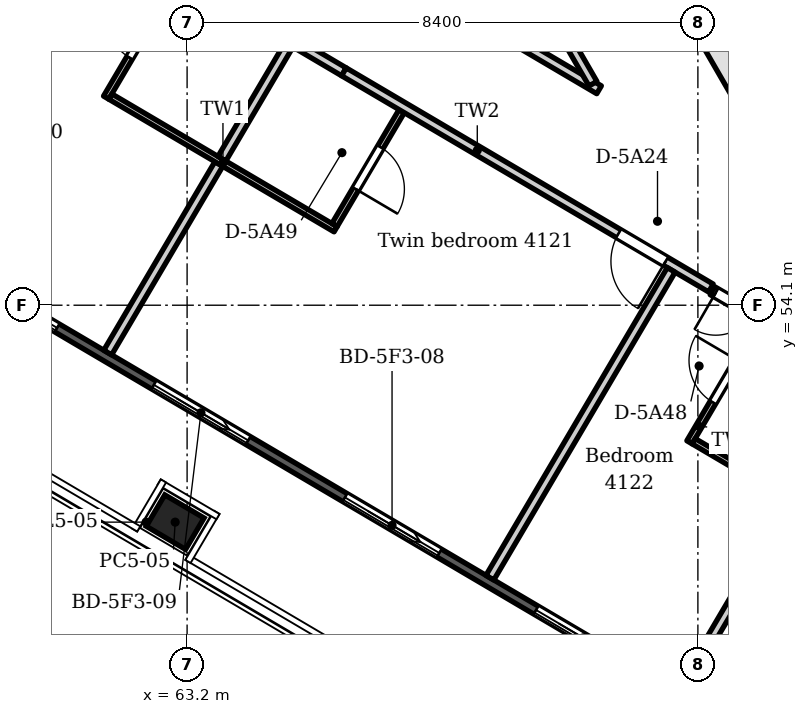
"""IFC4 building model, lengths in metres.
Left out: names, types, materials, properties, quantities, classifications, styles, units other than length and angle.
Written with IfcOpenShell. Run it as: python <this file> out.ifc"""

import sys

from ifc_helpers import new_model, si_unit, direction, frame, frame_2d, origin, origin_2d, place, context, subcontext, project, spatial, polyline, rectangle, outline, extrude, element, fill, save


model = new_model("IFC4")
c1 = context("Model", 3, precision=1e-05, world=origin(), true_north=direction((0.0, 1.0)))
c2 = subcontext(c1, "Body", "Model", "MODEL_VIEW")
j1 = project(units=[si_unit("LENGTHUNIT", "METRE"), si_unit("PLANEANGLEUNIT", "RADIAN")], contexts=[c1])
p1 = place(None, origin())
s1 = spatial("IfcSite", under=j1, at=p1, CompositionType="ELEMENT")
p2 = place(p1, origin())
s2 = spatial("IfcBuilding", under=s1, at=p2, CompositionType="ELEMENT")
p3 = place(p2, frame((0.0, 0.0, 161.1)))
s3 = spatial("IfcBuildingStorey", under=s2, at=p3, CompositionType="ELEMENT", Elevation=161.1)
p4 = place(p3, frame((71.117, 60.24, 0.0), z_axis=(0.0, 0.0, 1.0), x_axis=(0.500038571144, -0.866003133579, 0.0)))
e1 = element("IfcWall", 1, at=p4, inside=s3, PredefinedType="SHEAR", context=c2, shape_type="SweptSolid", body=[
    extrude(outline(polyline([(0.0, -0.45), (4.969, -0.45), (4.728, 0.45), (0.241, 0.45), (0.0, -0.45)])), origin(), (0.0, 0.0, 1.0), 3.6),
])
p5 = place(p4, frame((1.785, 0.0, 0.0)))
e2 = element("IfcOpeningElement", 2, at=p5, cuts=e1, PredefinedType="OPENING", context=c2, shape_type="SweptSolid", body=[
    extrude(rectangle(XDim=1.4, YDim=2.1, at=frame_2d((0.7, 1.05))), frame((0.0, 0.46, 0.0), z_axis=(0.0, -1.0, 0.0), x_axis=(1.0, 0.0, 0.0)), (0.0, 0.0, 1.0), 0.92),
])
p6 = place(p3, frame((63.004, 50.533, -0.35), z_axis=(0.0, 0.0, 1.0), x_axis=(-0.861629160442, 0.507538362961, 0.0)))
e3 = element("IfcColumn", 3, at=p6, inside=s3, PredefinedType="COLUMN", context=c2, shape_type="SweptSolid", body=[
    extrude(rectangle(XDim=0.75, YDim=0.6, at=origin_2d()), origin(), (0.0, 0.0, 1.0), 3.95),
])
p7 = place(p3, frame((90.139, 36.597, 0.0), z_axis=(0.0, 0.0, 1.0), x_axis=(-0.861630336939, 0.507536365659, 0.0)))
e4 = element("IfcWall", 4, at=p7, inside=s3, PredefinedType="SOLIDWALL", context=c2, shape_type="SweptSolid", body=[
    extrude(outline(polyline([(0.149, 0.075), (0.149, -0.075), (43.617, -0.075), (43.617, 0.075), (0.149, 0.075)])), origin(), (0.0, 0.0, 1.0), 3.3),
])
p8 = place(p7, frame((1.224, 0.0, 0.0)))
e5 = element("IfcOpeningElement", 5, at=p8, cuts=e4, PredefinedType="OPENING", context=c2, shape_type="SweptSolid", body=[
    extrude(rectangle(XDim=1.8, YDim=2.6, at=frame_2d((0.9, 1.3))), frame((0.0, 0.085, 0.0), z_axis=(0.0, -1.0, 0.0), x_axis=(1.0, 0.0, 0.0)), (0.0, 0.0, 1.0), 0.17),
])
p9 = place(p7, frame((4.571, 0.0, 0.0)))
e6 = element("IfcOpeningElement", 6, at=p9, cuts=e4, PredefinedType="OPENING", context=c2, shape_type="SweptSolid", body=[
    extrude(rectangle(XDim=1.8, YDim=2.6, at=frame_2d((0.9, 1.3))), frame((0.0, 0.085, 0.0), z_axis=(0.0, -1.0, 0.0), x_axis=(1.0, 0.0, 0.0)), (0.0, 0.0, 1.0), 0.17),
])
p10 = place(p7, frame((8.218, 0.0, 0.0)))
e7 = element("IfcOpeningElement", 7, at=p10, cuts=e4, PredefinedType="OPENING", context=c2, shape_type="SweptSolid", body=[
    extrude(rectangle(XDim=1.8, YDim=2.6, at=frame_2d((0.9, 1.3))), frame((0.0, 0.085, 0.0), z_axis=(0.0, -1.0, 0.0), x_axis=(1.0, 0.0, 0.0)), (0.0, 0.0, 1.0), 0.17),
])
p11 = place(p7, frame((11.865, 0.0, 0.0)))
e8 = element("IfcOpeningElement", 8, at=p11, cuts=e4, PredefinedType="OPENING", context=c2, shape_type="SweptSolid", body=[
    extrude(rectangle(XDim=1.8, YDim=2.6, at=frame_2d((0.9, 1.3))), frame((0.0, 0.085, 0.0), z_axis=(0.0, -1.0, 0.0), x_axis=(1.0, 0.0, 0.0)), (0.0, 0.0, 1.0), 0.17),
])
p12 = place(p7, frame((15.512, 0.0, 0.0)))
e9 = element("IfcOpeningElement", 9, at=p12, cuts=e4, PredefinedType="OPENING", context=c2, shape_type="SweptSolid", body=[
    extrude(rectangle(XDim=1.8, YDim=2.6, at=frame_2d((0.9, 1.3))), frame((0.0, 0.085, 0.0), z_axis=(0.0, -1.0, 0.0), x_axis=(1.0, 0.0, 0.0)), (0.0, 0.0, 1.0), 0.17),
])
p13 = place(p7, frame((19.16, 0.0, 0.0)))
e10 = element("IfcOpeningElement", 10, at=p13, cuts=e4, PredefinedType="OPENING", context=c2, shape_type="SweptSolid", body=[
    extrude(rectangle(XDim=1.8, YDim=2.6, at=frame_2d((0.9, 1.3))), frame((0.0, 0.085, 0.0), z_axis=(0.0, -1.0, 0.0), x_axis=(1.0, 0.0, 0.0)), (0.0, 0.0, 1.0), 0.17),
])
p14 = place(p7, frame((22.807, 0.0, 0.0)))
e11 = element("IfcOpeningElement", 11, at=p14, cuts=e4, PredefinedType="OPENING", context=c2, shape_type="SweptSolid", body=[
    extrude(rectangle(XDim=1.8, YDim=2.6, at=frame_2d((0.9, 1.3))), frame((0.0, 0.085, 0.0), z_axis=(0.0, -1.0, 0.0), x_axis=(1.0, 0.0, 0.0)), (0.0, 0.0, 1.0), 0.17),
])
p15 = place(p7, frame((26.454, 0.0, 0.0)))
e12 = element("IfcOpeningElement", 12, at=p15, cuts=e4, PredefinedType="OPENING", context=c2, shape_type="SweptSolid", body=[
    extrude(rectangle(XDim=1.8, YDim=2.6, at=frame_2d((0.9, 1.3))), frame((0.0, 0.085, 0.0), z_axis=(0.0, -1.0, 0.0), x_axis=(1.0, 0.0, 0.0)), (0.0, 0.0, 1.0), 0.17),
])
p16 = place(p7, frame((30.101, 0.0, 0.0)))
e13 = element("IfcOpeningElement", 13, at=p16, cuts=e4, PredefinedType="OPENING", context=c2, shape_type="SweptSolid", body=[
    extrude(rectangle(XDim=1.8, YDim=2.6, at=frame_2d((0.9, 1.3))), frame((0.0, 0.085, 0.0), z_axis=(0.0, -1.0, 0.0), x_axis=(1.0, 0.0, 0.0)), (0.0, 0.0, 1.0), 0.17),
])
p17 = place(p7, frame((33.748, 0.0, 0.0)))
e14 = element("IfcOpeningElement", 14, at=p17, cuts=e4, PredefinedType="OPENING", context=c2, shape_type="SweptSolid", body=[
    extrude(rectangle(XDim=1.8, YDim=2.6, at=frame_2d((0.9, 1.3))), frame((0.0, 0.085, 0.0), z_axis=(0.0, -1.0, 0.0), x_axis=(1.0, 0.0, 0.0)), (0.0, 0.0, 1.0), 0.17),
])
p18 = place(p7, frame((37.396, 0.0, 0.0)))
e15 = element("IfcOpeningElement", 15, at=p18, cuts=e4, PredefinedType="OPENING", context=c2, shape_type="SweptSolid", body=[
    extrude(rectangle(XDim=1.8, YDim=2.6, at=frame_2d((0.9, 1.3))), frame((0.0, 0.085, 0.0), z_axis=(0.0, -1.0, 0.0), x_axis=(1.0, 0.0, 0.0)), (0.0, 0.0, 1.0), 0.17),
])
p19 = place(p7, frame((40.743, 0.0, 0.0)))
e16 = element("IfcOpeningElement", 16, at=p19, cuts=e4, PredefinedType="OPENING", context=c2, shape_type="SweptSolid", body=[
    extrude(rectangle(XDim=1.8, YDim=2.6, at=frame_2d((0.9, 1.3))), frame((0.0, 0.085, 0.0), z_axis=(0.0, -1.0, 0.0), x_axis=(1.0, 0.0, 0.0)), (0.0, 0.0, 1.0), 0.17),
])
p20 = place(p3, frame((61.894, 53.322, 0.0), z_axis=(0.0, 0.0, 1.0), x_axis=(0.507657247854, 0.86155912084, 0.0)))
e17 = element("IfcWall", 17, at=p20, inside=s3, PredefinedType="PARTITIONING", context=c2, shape_type="SweptSolid", body=[
    extrude(rectangle(XDim=3.6, YDim=0.15, at=frame_2d((1.8, 0.0))), origin(), (0.0, 0.0, 1.0), 3.3),
])
p21 = place(p3, frame((61.869, 57.514, 0.0), z_axis=(0.0, 0.0, 1.0), x_axis=(0.50769515182, 0.861536785528, 0.0)))
e18 = element("IfcWall", 18, at=p21, inside=s3, PredefinedType="PARTITIONING", context=c2, shape_type="SweptSolid", body=[
    extrude(rectangle(XDim=2.276, YDim=0.1, at=frame_2d((1.138, 0.0))), origin(), (0.0, 0.0, 1.0), 3.3),
])
p22 = place(p21, frame((0.763, 0.0, 0.0)))
e19 = element("IfcOpeningElement", 19, at=p22, cuts=e18, PredefinedType="OPENING", context=c2, shape_type="SweptSolid", body=[
    extrude(rectangle(XDim=0.8, YDim=2.1, at=frame_2d((0.4, 1.05))), frame((0.0, 0.06, 0.0), z_axis=(0.0, -1.0, 0.0), x_axis=(1.0, 0.0, 0.0)), (0.0, 0.0, 1.0), 0.12),
])
p23 = place(p3, frame((61.937, 57.531, 0.0), z_axis=(0.0, 0.0, 1.0), x_axis=(0.861687435641, -0.507439418313, 0.0)))
e20 = element("IfcWall", 20, at=p23, inside=s3, PredefinedType="PARTITIONING", context=c2, shape_type="SweptSolid", body=[
    extrude(rectangle(XDim=4.3, YDim=0.1, at=frame_2d((2.15, 0.0))), origin(), (0.0, 0.0, 1.0), 3.3),
])
p24 = place(p3, frame((63.772, 56.509, 0.0), z_axis=(0.0, 0.0, 1.0), x_axis=(0.507359649966, 0.861734405479, 0.0)))
e21 = element("IfcWall", 21, at=p24, inside=s3, PredefinedType="PARTITIONING", context=c2, shape_type="SweptSolid", body=[
    extrude(rectangle(XDim=2.325, YDim=0.15, at=frame_2d((1.163, 0.0))), origin(), (0.0, 0.0, 1.0), 3.3),
])
p25 = place(p3, frame((64.976, 58.412, 0.0), z_axis=(0.0, 0.0, 1.0), x_axis=(0.861348284073, -0.508014894982, 0.0)))
e22 = element("IfcWall", 22, at=p25, inside=s3, PredefinedType="PARTITIONING", context=c2, shape_type="SweptSolid", body=[
    extrude(rectangle(XDim=0.933, YDim=0.15, at=frame_2d((0.466, 0.0))), origin(), (0.0, 0.0, 1.0), 3.3),
])
p26 = place(p3, frame((65.625, 55.418, 0.0), z_axis=(0.0, 0.0, 1.0), x_axis=(0.507893177668, 0.861420060179, 0.0)))
e23 = element("IfcWall", 23, at=p26, inside=s3, PredefinedType="PARTITIONING", context=c2, shape_type="SweptSolid", body=[
    extrude(rectangle(XDim=2.175, YDim=0.1, at=frame_2d((1.087, 0.0))), origin(), (0.0, 0.0, 1.0), 3.3),
])
p27 = place(p26, frame((0.687, 0.0, 0.0)))
e24 = element("IfcOpeningElement", 24, at=p27, cuts=e23, PredefinedType="OPENING", context=c2, shape_type="SweptSolid", body=[
    extrude(rectangle(XDim=0.8, YDim=2.1, at=frame_2d((0.4, 1.05))), frame((0.0, 0.06, 0.0), z_axis=(0.0, -1.0, 0.0), x_axis=(1.0, 0.0, 0.0)), (0.0, 0.0, 1.0), 0.12),
])
p28 = place(p3, frame((65.779, 57.938, 0.0), z_axis=(0.0, 0.0, 1.0), x_axis=(0.861623120435, -0.507548616718, 0.0)))
e25 = element("IfcWall", 25, at=p28, inside=s3, PredefinedType="PARTITIONING", context=c2, shape_type="SweptSolid", body=[
    extrude(rectangle(XDim=7.004, YDim=0.15, at=frame_2d((3.502, 0.0))), origin(), (0.0, 0.0, 1.0), 3.3),
])
p29 = place(p28, frame((5.24, 0.0, 0.0)))
e26 = element("IfcOpeningElement", 26, at=p29, cuts=e25, PredefinedType="OPENING", context=c2, shape_type="SweptSolid", body=[
    extrude(rectangle(XDim=0.9, YDim=2.1, at=frame_2d((0.45, 1.05))), frame((0.0, 0.085, 0.0), z_axis=(0.0, -1.0, 0.0), x_axis=(1.0, 0.0, 0.0)), (0.0, 0.0, 1.0), 0.17),
])
p30 = place(p3, frame((65.863, 60.065, 0.0), z_axis=(0.0, 0.0, 1.0), x_axis=(0.861635540959, -0.507527530835, 0.0)))
e27 = element("IfcWall", 27, at=p30, inside=s3, PredefinedType="PARTITIONING", context=c2, shape_type="SweptSolid", body=[
    extrude(rectangle(XDim=4.772, YDim=0.15, at=frame_2d((2.386, 0.0))), origin(), (0.0, 0.0, 1.0), 3.3),
])
p31 = place(p30, frame((1.899, 0.0, 0.0)))
e28 = element("IfcOpeningElement", 28, at=p31, cuts=e27, PredefinedType="OPENING", context=c2, shape_type="SweptSolid", body=[
    extrude(rectangle(XDim=0.9, YDim=2.1, at=frame_2d((0.45, 1.05))), frame((0.0, 0.085, 0.0), z_axis=(0.0, -1.0, 0.0), x_axis=(1.0, 0.0, 0.0)), (0.0, 0.0, 1.0), 0.17),
])
p32 = place(p3, frame((68.179, 49.619, 0.0), z_axis=(0.0, 0.0, 1.0), x_axis=(0.507603061138, 0.861591047031, 0.0)))
e29 = element("IfcWall", 29, at=p32, inside=s3, PredefinedType="PARTITIONING", context=c2, shape_type="SweptSolid", body=[
    extrude(rectangle(XDim=5.874, YDim=0.15, at=frame_2d((2.937, 0.0))), origin(), (0.0, 0.0, 1.0), 3.3),
])
p33 = place(p3, frame((68.889, 59.448, 0.0), z_axis=(0.0, 0.0, 1.0), x_axis=(0.500259007655, -0.865875813994, 0.0)))
e30 = element("IfcWall", 30, at=p33, inside=s3, PredefinedType="PARTITIONING", context=c2, shape_type="SweptSolid", body=[
    extrude(rectangle(XDim=1.969, YDim=0.15, at=frame_2d((0.985, 0.0))), origin(), (0.0, 0.0, 1.0), 3.3),
])
p34 = place(p3, frame((71.322, 47.769, 0.0), z_axis=(0.0, 0.0, 1.0), x_axis=(0.507419363551, 0.861699245383, 0.0)))
e31 = element("IfcWall", 31, at=p34, inside=s3, PredefinedType="PARTITIONING", context=c2, shape_type="SweptSolid", body=[
    extrude(rectangle(XDim=3.688, YDim=0.15, at=frame_2d((1.844, 0.0))), origin(), (0.0, 0.0, 1.0), 3.3),
])
p35 = place(p3, frame((71.462, 51.846, 0.0), z_axis=(0.0, 0.0, 1.0), x_axis=(0.507433164297, 0.861691118541, 0.0)))
e32 = element("IfcWall", 32, at=p35, inside=s3, PredefinedType="PARTITIONING", context=c2, shape_type="SweptSolid", body=[
    extrude(rectangle(XDim=2.273, YDim=0.1, at=frame_2d((1.136, 0.0))), origin(), (0.0, 0.0, 1.0), 3.3),
])
p36 = place(p35, frame((0.761, 0.0, 0.0)))
e33 = element("IfcOpeningElement", 33, at=p36, cuts=e32, PredefinedType="OPENING", context=c2, shape_type="SweptSolid", body=[
    extrude(rectangle(XDim=0.8, YDim=2.1, at=frame_2d((0.4, 1.05))), frame((0.0, 0.06, 0.0), z_axis=(0.0, -1.0, 0.0), x_axis=(1.0, 0.0, 0.0)), (0.0, 0.0, 1.0), 0.12),
])
p37 = place(p3, frame((71.53, 51.864, 0.0), z_axis=(0.0, 0.0, 1.0), x_axis=(0.861772491813, -0.507294955972, 0.0)))
e34 = element("IfcWall", 34, at=p37, inside=s3, PredefinedType="PARTITIONING", context=c2, shape_type="SweptSolid", body=[
    extrude(rectangle(XDim=1.824, YDim=0.1, at=frame_2d((0.912, 0.0))), origin(), (0.0, 0.0, 1.0), 3.3),
])
p38 = place(p3, frame((71.839, 54.339, 0.0), z_axis=(0.0, 0.0, 1.0), x_axis=(0.865780375256, -0.500424161908, 0.0)))
e35 = element("IfcWall", 35, at=p38, inside=s3, PredefinedType="PARTITIONING", context=c2, shape_type="SweptSolid", body=[
    extrude(rectangle(XDim=0.944, YDim=0.15, at=frame_2d((0.472, 0.0))), origin(), (0.0, 0.0, 1.0), 3.3),
])
p39 = place(p38, frame((0.064, 0.0, 0.0)))
e36 = element("IfcOpeningElement", 36, at=p39, cuts=e35, PredefinedType="OPENING", context=c2, shape_type="SweptSolid", body=[
    extrude(rectangle(XDim=0.7, YDim=2.1, at=frame_2d((0.35, 1.05))), frame((0.0, 0.085, 0.0), z_axis=(0.0, -1.0, 0.0), x_axis=(1.0, 0.0, 0.0)), (0.0, 0.0, 1.0), 0.17),
])
p40 = place(p14, origin())
e37 = element("IfcDoor", 37, at=p40, inside=s3, OperationType="SLIDING_TO_LEFT", PredefinedType="DOOR", context=c2, shape_type="SweptSolid", body=[
    extrude(rectangle(XDim=1.8, YDim=2.6, at=frame_2d((0.9, 1.3))), frame((0.0, 0.025, 0.0), z_axis=(0.0, -1.0, 0.0), x_axis=(1.0, 0.0, 0.0)), (0.0, 0.0, 1.0), 0.05),
])
fill(e11, e37)
p41 = place(p15, origin())
e38 = element("IfcDoor", 38, at=p41, inside=s3, OperationType="SLIDING_TO_LEFT", PredefinedType="DOOR", context=c2, shape_type="SweptSolid", body=[
    extrude(rectangle(XDim=1.8, YDim=2.6, at=frame_2d((0.9, 1.3))), frame((0.0, 0.025, 0.0), z_axis=(0.0, -1.0, 0.0), x_axis=(1.0, 0.0, 0.0)), (0.0, 0.0, 1.0), 0.05),
])
fill(e12, e38)
p42 = place(p16, origin())
e39 = element("IfcDoor", 39, at=p42, inside=s3, OperationType="SLIDING_TO_LEFT", PredefinedType="DOOR", context=c2, shape_type="SweptSolid", body=[
    extrude(rectangle(XDim=1.8, YDim=2.6, at=frame_2d((0.9, 1.3))), frame((0.0, 0.025, 0.0), z_axis=(0.0, -1.0, 0.0), x_axis=(1.0, 0.0, 0.0)), (0.0, 0.0, 1.0), 0.05),
])
fill(e13, e39)
p43 = place(p17, origin())
e40 = element("IfcDoor", 40, at=p43, inside=s3, OperationType="SLIDING_TO_LEFT", PredefinedType="DOOR", context=c2, shape_type="SweptSolid", body=[
    extrude(rectangle(XDim=1.8, YDim=2.6, at=frame_2d((0.9, 1.3))), frame((0.0, 0.025, 0.0), z_axis=(0.0, -1.0, 0.0), x_axis=(1.0, 0.0, 0.0)), (0.0, 0.0, 1.0), 0.05),
])
fill(e14, e40)
p44 = place(p39, frame((0.7, 0.0, 0.0), z_axis=(0.0, 0.0, 1.0), x_axis=(-1.0, 0.0, 0.0)))
e41 = element("IfcDoor", 41, at=p44, inside=s3, OperationType="SINGLE_SWING_RIGHT", PredefinedType="DOOR", context=c2, shape_type="SweptSolid", body=[
    extrude(rectangle(XDim=0.7, YDim=2.1, at=frame_2d((0.35, 1.05))), frame((0.0, 0.025, 0.0), z_axis=(0.0, -1.0, 0.0), x_axis=(1.0, 0.0, 0.0)), (0.0, 0.0, 1.0), 0.05),
])
fill(e36, e41)
p45 = place(p29, frame((0.9, 0.0, 0.0), z_axis=(0.0, 0.0, 1.0), x_axis=(-1.0, 0.0, 0.0)))
e42 = element("IfcDoor", 42, at=p45, inside=s3, OperationType="SINGLE_SWING_LEFT", PredefinedType="DOOR", context=c2, shape_type="SweptSolid", body=[
    extrude(rectangle(XDim=0.9, YDim=2.1, at=frame_2d((0.45, 1.05))), frame((0.0, 0.025, 0.0), z_axis=(0.0, -1.0, 0.0), x_axis=(1.0, 0.0, 0.0)), (0.0, 0.0, 1.0), 0.05),
])
fill(e26, e42)
p46 = place(p36, origin())
e43 = element("IfcDoor", 43, at=p46, inside=s3, OperationType="SINGLE_SWING_RIGHT", PredefinedType="DOOR", context=c2, shape_type="SweptSolid", body=[
    extrude(rectangle(XDim=0.8, YDim=2.1, at=frame_2d((0.4, 1.05))), frame((0.0, 0.025, 0.0), z_axis=(0.0, -1.0, 0.0), x_axis=(1.0, 0.0, 0.0)), (0.0, 0.0, 1.0), 0.05),
])
fill(e33, e43)
p47 = place(p27, frame((0.8, 0.0, 0.0), z_axis=(0.0, 0.0, 1.0), x_axis=(-1.0, 0.0, 0.0)))
e44 = element("IfcDoor", 44, at=p47, inside=s3, OperationType="SINGLE_SWING_RIGHT", PredefinedType="DOOR", context=c2, shape_type="SweptSolid", body=[
    extrude(rectangle(XDim=0.8, YDim=2.1, at=frame_2d((0.4, 1.05))), frame((0.0, 0.025, 0.0), z_axis=(0.0, -1.0, 0.0), x_axis=(1.0, 0.0, 0.0)), (0.0, 0.0, 1.0), 0.05),
])
fill(e24, e44)
p48 = place(p22, origin())
e45 = element("IfcDoor", 45, at=p48, inside=s3, OperationType="SINGLE_SWING_RIGHT", PredefinedType="DOOR", context=c2, shape_type="SweptSolid", body=[
    extrude(rectangle(XDim=0.8, YDim=2.1, at=frame_2d((0.4, 1.05))), frame((0.0, 0.025, 0.0), z_axis=(0.0, -1.0, 0.0), x_axis=(1.0, 0.0, 0.0)), (0.0, 0.0, 1.0), 0.05),
])
fill(e19, e45)
p49 = place(p5, origin())
e46 = element("IfcDoor", 46, at=p49, inside=s3, OperationType="DOUBLE_DOOR_SINGLE_SWING", PredefinedType="DOOR", context=c2, shape_type="SweptSolid", body=[
    extrude(rectangle(XDim=1.4, YDim=2.1, at=frame_2d((0.7, 1.05))), frame((0.0, 0.025, 0.0), z_axis=(0.0, -1.0, 0.0), x_axis=(1.0, 0.0, 0.0)), (0.0, 0.0, 1.0), 0.05),
])
fill(e2, e46)
save(model, sys.argv[1])
